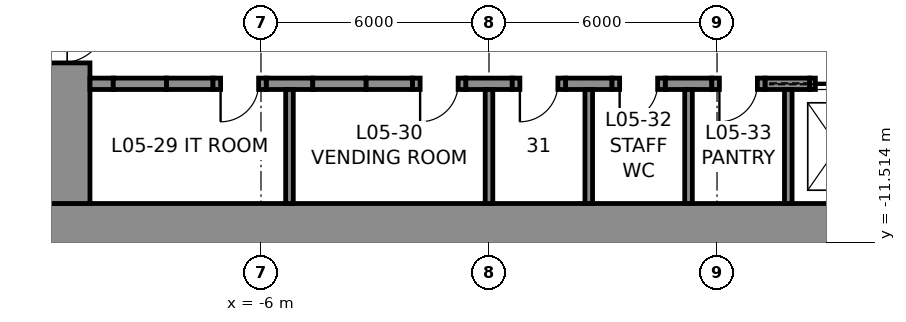
"""IFC4 building model, lengths in metres.
Left out: names, types, materials, properties, quantities, classifications, styles, units other than length and angle.
Written with IfcOpenShell. Run it as: python <this file> out.ifc"""

import sys

from ifc_helpers import new_model, si_unit, direction, frame, frame_2d, origin, place, context, subcontext, project, spatial, rectangle, extrude, element, fill, save


model = new_model("IFC4")
c1 = context("Model", 3, precision=1e-05, world=origin(), true_north=direction((0.0, 1.0)))
c2 = subcontext(c1, "Body", "Model", "MODEL_VIEW")
j1 = project(units=[si_unit("LENGTHUNIT", "METRE"), si_unit("PLANEANGLEUNIT", "RADIAN")], contexts=[c1])
p1 = place(None, origin())
s1 = spatial("IfcSite", under=j1, at=p1, CompositionType="ELEMENT")
p2 = place(p1, origin())
s2 = spatial("IfcBuilding", under=s1, at=p2, CompositionType="ELEMENT")
p3 = place(p2, frame((0.0, 0.0, 26.5)))
s3 = spatial("IfcBuildingStorey", under=s2, at=p3, CompositionType="ELEMENT", Elevation=26.5)
p4 = place(p3, frame((12.0, -11.25, 0.0), z_axis=(0.0, 0.0, 1.0), x_axis=(-1.0, 0.0, 0.0)))
e1 = element("IfcWall", 1, at=p4, inside=s3, PredefinedType="SHEAR", context=c2, shape_type="SweptSolid", body=[
    extrude(rectangle(XDim=24.0, YDim=1.5, at=frame_2d((12.0, 0.0))), origin(), (0.0, 0.0, 1.0), 5.5),
])
p5 = place(p3, frame((-11.25, -10.5, 0.0), z_axis=(0.0, 0.0, 1.0), x_axis=(0.0, 1.0, 0.0)))
e2 = element("IfcWall", 2, at=p5, inside=s3, PredefinedType="SHEAR", context=c2, shape_type="SweptSolid", body=[
    extrude(rectangle(XDim=21.0, YDim=1.5, at=frame_2d((10.5, 0.0))), origin(), (0.0, 0.0, 1.0), 5.5),
])
p6 = place(p5, frame((16.1, 0.0, 0.0)))
e3 = element("IfcOpeningElement", 3, at=p6, cuts=e2, PredefinedType="OPENING", context=c2, shape_type="SweptSolid", body=[
    extrude(rectangle(XDim=1.2, YDim=2.3, at=frame_2d((0.6, 1.15))), frame((0.0, 0.76, 0.0), z_axis=(0.0, -1.0, 0.0), x_axis=(1.0, 0.0, 0.0)), (0.0, 0.0, 1.0), 1.52),
])
p7 = place(p5, frame((3.7, 0.0, 0.0)))
e4 = element("IfcOpeningElement", 4, at=p7, cuts=e2, PredefinedType="OPENING", context=c2, shape_type="SweptSolid", body=[
    extrude(rectangle(XDim=1.2, YDim=2.3, at=frame_2d((0.6, 1.15))), frame((0.0, 0.76, 0.0), z_axis=(0.0, -1.0, 0.0), x_axis=(1.0, 0.0, 0.0)), (0.0, 0.0, 1.0), 1.52),
])
p8 = place(p3, frame((-10.5, -7.35, 0.0), z_axis=(0.0, 0.0, 1.0), x_axis=(1.0, 0.0, 0.0)))
e5 = element("IfcWall", 5, at=p8, inside=s3, PredefinedType="SHEAR", context=c2, shape_type="SweptSolid", body=[
    extrude(rectangle(XDim=0.613, YDim=0.3, at=frame_2d((0.306, 0.0))), origin(), (0.0, 0.0, 1.0), 5.5),
])
for number, where, z_axis, x_axis in (
    (6, (-8.488, -7.35, 0.0), (0.0, 0.0, 1.0), (1.0, 0.0, 0.0)),
    (7, (-5.863, -7.35, 0.0), (0.0, 0.0, 1.0), (1.0, 0.0, 0.0)),
    (8, (-3.238, -7.35, 0.0), (0.0, 0.0, 1.0), (1.0, 0.0, 0.0)),
    (9, (-0.613, -7.35, 0.0), (0.0, 0.0, 1.0), (1.0, 0.0, 0.0)),
    (10, (2.012, -7.35, 0.0), (0.0, 0.0, 1.0), (1.0, 0.0, 0.0)),
    (11, (4.637, -7.35, 0.0), (0.0, 0.0, 1.0), (1.0, 0.0, 0.0)),
):
    element("IfcWall", number, at=place(p3, frame(where, z_axis=z_axis, x_axis=x_axis)), inside=s3, PredefinedType="SHEAR", context=c2, shape_type="SweptSolid", body=[
        extrude(rectangle(XDim=1.225, YDim=0.3, at=frame_2d((0.613, 0.0))), origin(), (0.0, 0.0, 1.0), 5.5),
    ])
p9 = place(p3, frame((7.262, -7.35, 0.0), z_axis=(0.0, 0.0, 1.0), x_axis=(1.0, 0.0, 0.0)))
e12 = element("IfcWall", 12, at=p9, inside=s3, PredefinedType="SHEAR", context=c2, shape_type="SweptSolid", body=[
    extrude(rectangle(XDim=1.175, YDim=0.3, at=frame_2d((0.587, 0.0))), origin(), (0.0, 0.0, 1.0), 5.5),
])
p10 = place(p3, frame((-9.887, -7.35, 0.0), z_axis=(0.0, 0.0, 1.0), x_axis=(1.0, 0.0, 0.0)))
e13 = element("IfcWall", 13, at=p10, inside=s3, PredefinedType="PARTITIONING", context=c2, shape_type="SweptSolid", body=[
    extrude(rectangle(XDim=1.4, YDim=0.3, at=frame_2d((0.7, 0.0))), origin(), (0.0, 0.0, 1.0), 5.5),
])
p11 = place(p3, frame((-7.262, -7.35, 0.0), z_axis=(0.0, 0.0, 1.0), x_axis=(1.0, 0.0, 0.0)))
e14 = element("IfcWall", 14, at=p11, inside=s3, PredefinedType="PARTITIONING", context=c2, shape_type="SweptSolid", body=[
    extrude(rectangle(XDim=1.4, YDim=0.3, at=frame_2d((0.7, 0.0))), origin(), (0.0, 0.0, 1.0), 5.5),
])
p12 = place(p11, frame((0.2, 0.0, 0.0)))
e15 = element("IfcOpeningElement", 15, at=p12, cuts=e14, PredefinedType="OPENING", context=c2, shape_type="SweptSolid", body=[
    extrude(rectangle(XDim=1.0, YDim=2.3, at=frame_2d((0.5, 1.15))), frame((0.0, 0.16, 0.0), z_axis=(0.0, -1.0, 0.0), x_axis=(1.0, 0.0, 0.0)), (0.0, 0.0, 1.0), 0.32),
])
p13 = place(p3, frame((-4.637, -7.35, 0.0), z_axis=(0.0, 0.0, 1.0), x_axis=(1.0, 0.0, 0.0)))
e16 = element("IfcWall", 16, at=p13, inside=s3, PredefinedType="PARTITIONING", context=c2, shape_type="SweptSolid", body=[
    extrude(rectangle(XDim=1.4, YDim=0.3, at=frame_2d((0.7, 0.0))), origin(), (0.0, 0.0, 1.0), 5.5),
])
p14 = place(p3, frame((-2.012, -7.35, 0.0), z_axis=(0.0, 0.0, 1.0), x_axis=(1.0, 0.0, 0.0)))
e17 = element("IfcWall", 17, at=p14, inside=s3, PredefinedType="PARTITIONING", context=c2, shape_type="SweptSolid", body=[
    extrude(rectangle(XDim=1.4, YDim=0.3, at=frame_2d((0.7, 0.0))), origin(), (0.0, 0.0, 1.0), 5.5),
])
p15 = place(p14, frame((0.2, 0.0, 0.0)))
e18 = element("IfcOpeningElement", 18, at=p15, cuts=e17, PredefinedType="OPENING", context=c2, shape_type="SweptSolid", body=[
    extrude(rectangle(XDim=1.0, YDim=2.3, at=frame_2d((0.5, 1.15))), frame((0.0, 0.16, 0.0), z_axis=(0.0, -1.0, 0.0), x_axis=(1.0, 0.0, 0.0)), (0.0, 0.0, 1.0), 0.32),
])
p16 = place(p3, frame((0.613, -7.35, 0.0), z_axis=(0.0, 0.0, 1.0), x_axis=(1.0, 0.0, 0.0)))
e19 = element("IfcWall", 19, at=p16, inside=s3, PredefinedType="PARTITIONING", context=c2, shape_type="SweptSolid", body=[
    extrude(rectangle(XDim=1.4, YDim=0.3, at=frame_2d((0.7, 0.0))), origin(), (0.0, 0.0, 1.0), 5.5),
])
p17 = place(p16, frame((0.2, 0.0, 0.0)))
e20 = element("IfcOpeningElement", 20, at=p17, cuts=e19, PredefinedType="OPENING", context=c2, shape_type="SweptSolid", body=[
    extrude(rectangle(XDim=1.0, YDim=2.3, at=frame_2d((0.5, 1.15))), frame((0.0, 0.16, 0.0), z_axis=(0.0, -1.0, 0.0), x_axis=(1.0, 0.0, 0.0)), (0.0, 0.0, 1.0), 0.32),
])
p18 = place(p3, frame((3.238, -7.35, 0.0), z_axis=(0.0, 0.0, 1.0), x_axis=(1.0, 0.0, 0.0)))
e21 = element("IfcWall", 21, at=p18, inside=s3, PredefinedType="PARTITIONING", context=c2, shape_type="SweptSolid", body=[
    extrude(rectangle(XDim=1.4, YDim=0.3, at=frame_2d((0.7, 0.0))), origin(), (0.0, 0.0, 1.0), 5.5),
])
p19 = place(p18, frame((0.2, 0.0, 0.0)))
e22 = element("IfcOpeningElement", 22, at=p19, cuts=e21, PredefinedType="OPENING", context=c2, shape_type="SweptSolid", body=[
    extrude(rectangle(XDim=1.0, YDim=2.3, at=frame_2d((0.5, 1.15))), frame((0.0, 0.16, 0.0), z_axis=(0.0, -1.0, 0.0), x_axis=(1.0, 0.0, 0.0)), (0.0, 0.0, 1.0), 0.32),
])
p20 = place(p3, frame((5.863, -7.35, 0.0), z_axis=(0.0, 0.0, 1.0), x_axis=(1.0, 0.0, 0.0)))
e23 = element("IfcWall", 23, at=p20, inside=s3, PredefinedType="PARTITIONING", context=c2, shape_type="SweptSolid", body=[
    extrude(rectangle(XDim=1.4, YDim=0.3, at=frame_2d((0.7, 0.0))), origin(), (0.0, 0.0, 1.0), 5.5),
])
p21 = place(p20, frame((0.2, 0.0, 0.0)))
e24 = element("IfcOpeningElement", 24, at=p21, cuts=e23, PredefinedType="OPENING", context=c2, shape_type="SweptSolid", body=[
    extrude(rectangle(XDim=1.0, YDim=2.3, at=frame_2d((0.5, 1.15))), frame((0.0, 0.16, 0.0), z_axis=(0.0, -1.0, 0.0), x_axis=(1.0, 0.0, 0.0)), (0.0, 0.0, 1.0), 0.32),
])
p22 = place(p3, frame((8.438, -7.35, 0.0), z_axis=(0.0, 0.0, 1.0), x_axis=(1.0, 0.0, 0.0)))
e25 = element("IfcWall", 25, at=p22, inside=s3, PredefinedType="PARTITIONING", context=c2, shape_type="SweptSolid", body=[
    extrude(rectangle(XDim=1.5, YDim=0.3, at=frame_2d((0.75, 0.0))), origin(), (0.0, 0.0, 1.0), 5.5),
])
p23 = place(p22, frame((0.15, 0.0, 0.0)))
e26 = element("IfcOpeningElement", 26, at=p23, cuts=e25, PredefinedType="OPENING", context=c2, shape_type="SweptSolid", body=[
    extrude(rectangle(XDim=1.2, YDim=2.3, at=frame_2d((0.6, 1.15))), frame((0.0, 0.16, 0.0), z_axis=(0.0, -1.0, 0.0), x_axis=(1.0, 0.0, 0.0)), (0.0, 0.0, 1.0), 0.32),
])
for number, where, z_axis, x_axis in (
    (27, (-5.25, -10.5, 0.0), (0.0, 0.0, 1.0), (0.0, 1.0, 0.0)),
    (28, (0.0, -10.5, 0.0), (0.0, 0.0, 1.0), (0.0, 1.0, 0.0)),
    (29, (2.625, -10.5, 0.0), (0.0, 0.0, 1.0), (0.0, 1.0, 0.0)),
    (30, (5.25, -10.5, 0.0), (0.0, 0.0, 1.0), (0.0, 1.0, 0.0)),
    (31, (7.875, -10.5, 0.0), (0.0, 0.0, 1.0), (0.0, 1.0, 0.0)),
):
    element("IfcWall", number, at=place(p3, frame(where, z_axis=z_axis, x_axis=x_axis)), inside=s3, PredefinedType="PARTITIONING", context=c2, shape_type="SweptSolid", body=[
        extrude(rectangle(XDim=3.0, YDim=0.2, at=frame_2d((1.5, 0.0))), origin(), (0.0, 0.0, 1.0), 5.5),
    ])
p24 = place(p12, frame((1.0, 0.0, 0.0), z_axis=(0.0, 0.0, 1.0), x_axis=(-1.0, 0.0, 0.0)))
e32 = element("IfcDoor", 32, at=p24, inside=s3, OperationType="SINGLE_SWING_RIGHT", PredefinedType="DOOR", context=c2, shape_type="SweptSolid", body=[
    extrude(rectangle(XDim=1.0, YDim=2.3, at=frame_2d((0.5, 1.15))), frame((0.0, 0.025, 0.0), z_axis=(0.0, -1.0, 0.0), x_axis=(1.0, 0.0, 0.0)), (0.0, 0.0, 1.0), 0.05),
])
fill(e15, e32)
p25 = place(p15, frame((1.0, 0.0, 0.0), z_axis=(0.0, 0.0, 1.0), x_axis=(-1.0, 0.0, 0.0)))
e33 = element("IfcDoor", 33, at=p25, inside=s3, OperationType="SINGLE_SWING_RIGHT", PredefinedType="DOOR", context=c2, shape_type="SweptSolid", body=[
    extrude(rectangle(XDim=1.0, YDim=2.3, at=frame_2d((0.5, 1.15))), frame((0.0, 0.025, 0.0), z_axis=(0.0, -1.0, 0.0), x_axis=(1.0, 0.0, 0.0)), (0.0, 0.0, 1.0), 0.05),
])
fill(e18, e33)
p26 = place(p17, frame((1.0, 0.0, 0.0), z_axis=(0.0, 0.0, 1.0), x_axis=(-1.0, 0.0, 0.0)))
e34 = element("IfcDoor", 34, at=p26, inside=s3, OperationType="SINGLE_SWING_RIGHT", PredefinedType="DOOR", context=c2, shape_type="SweptSolid", body=[
    extrude(rectangle(XDim=1.0, YDim=2.3, at=frame_2d((0.5, 1.15))), frame((0.0, 0.025, 0.0), z_axis=(0.0, -1.0, 0.0), x_axis=(1.0, 0.0, 0.0)), (0.0, 0.0, 1.0), 0.05),
])
fill(e20, e34)
p27 = place(p19, frame((1.0, 0.0, 0.0), z_axis=(0.0, 0.0, 1.0), x_axis=(-1.0, 0.0, 0.0)))
e35 = element("IfcDoor", 35, at=p27, inside=s3, OperationType="SINGLE_SWING_RIGHT", PredefinedType="DOOR", context=c2, shape_type="SweptSolid", body=[
    extrude(rectangle(XDim=1.0, YDim=2.3, at=frame_2d((0.5, 1.15))), frame((0.0, 0.025, 0.0), z_axis=(0.0, -1.0, 0.0), x_axis=(1.0, 0.0, 0.0)), (0.0, 0.0, 1.0), 0.05),
])
fill(e22, e35)
p28 = place(p21, frame((1.0, 0.0, 0.0), z_axis=(0.0, 0.0, 1.0), x_axis=(-1.0, 0.0, 0.0)))
e36 = element("IfcDoor", 36, at=p28, inside=s3, OperationType="SINGLE_SWING_RIGHT", PredefinedType="DOOR", context=c2, shape_type="SweptSolid", body=[
    extrude(rectangle(XDim=1.0, YDim=2.3, at=frame_2d((0.5, 1.15))), frame((0.0, 0.025, 0.0), z_axis=(0.0, -1.0, 0.0), x_axis=(1.0, 0.0, 0.0)), (0.0, 0.0, 1.0), 0.05),
])
fill(e24, e36)
p29 = place(p7, frame((1.2, 0.0, 0.0), z_axis=(0.0, 0.0, 1.0), x_axis=(-1.0, 0.0, 0.0)))
e37 = element("IfcDoor", 37, at=p29, inside=s3, OperationType="SINGLE_SWING_LEFT", PredefinedType="DOOR", context=c2, shape_type="SweptSolid", body=[
    extrude(rectangle(XDim=1.2, YDim=2.3, at=frame_2d((0.6, 1.15))), frame((0.0, 0.025, 0.0), z_axis=(0.0, -1.0, 0.0), x_axis=(1.0, 0.0, 0.0)), (0.0, 0.0, 1.0), 0.05),
])
fill(e4, e37)
p30 = place(p23, origin())
e38 = element("IfcDoor", 38, at=p30, inside=s3, OperationType="SLIDING_TO_LEFT", PredefinedType="DOOR", context=c2, shape_type="SweptSolid", body=[
    extrude(rectangle(XDim=1.2, YDim=2.3, at=frame_2d((0.6, 1.15))), frame((0.0, 0.025, 0.0), z_axis=(0.0, -1.0, 0.0), x_axis=(1.0, 0.0, 0.0)), (0.0, 0.0, 1.0), 0.05),
])
fill(e26, e38)
save(model, sys.argv[1])
